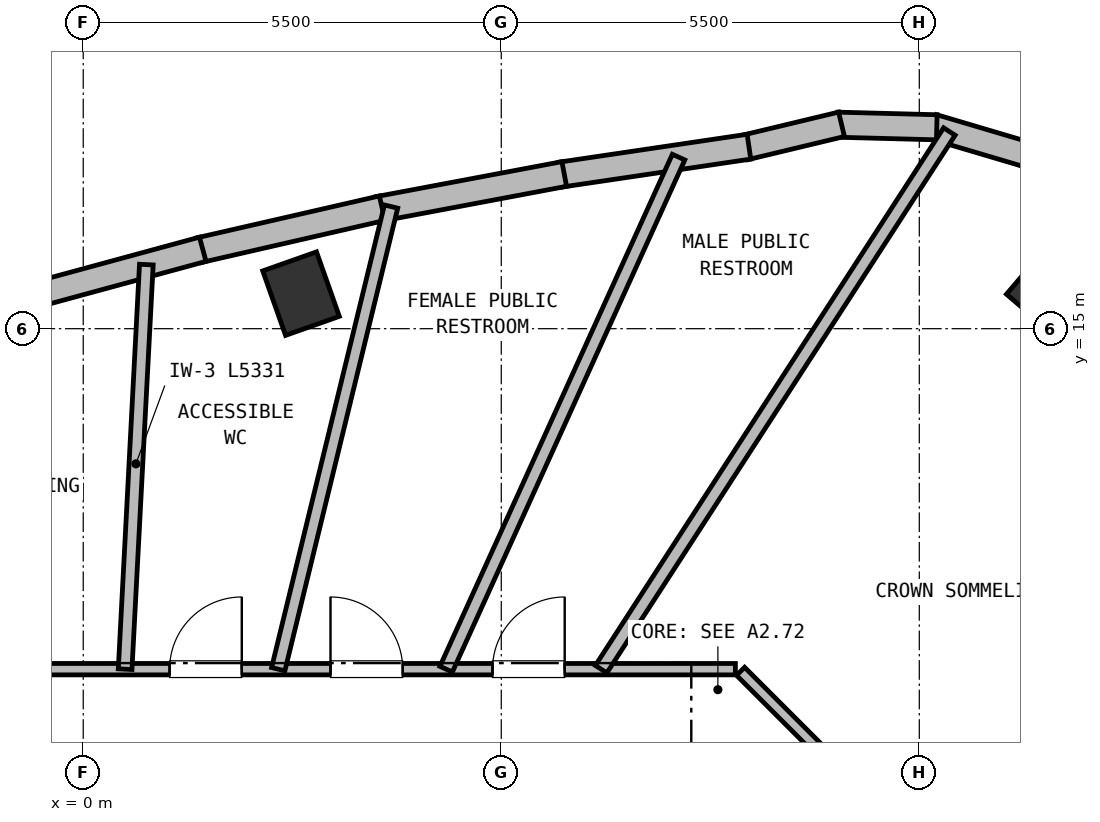
"""IFC4 building model, lengths in metres.
Left out: names, types, materials, properties, quantities, classifications, styles, units other than length and angle.
Written with IfcOpenShell. Run it as: python <this file> out.ifc"""

import sys

from ifc_helpers import new_model, si_unit, direction, frame, frame_2d, origin, origin_2d, place, context, subcontext, project, spatial, rectangle, extrude, element, fill, save


model = new_model("IFC4")
c1 = context("Model", 3, precision=1e-05, world=origin(), true_north=direction((0.0, 1.0)))
c2 = subcontext(c1, "Body", "Model", "MODEL_VIEW")
j1 = project(units=[si_unit("LENGTHUNIT", "METRE"), si_unit("PLANEANGLEUNIT", "RADIAN")], contexts=[c1])
p1 = place(None, origin())
s1 = spatial("IfcSite", under=j1, at=p1, CompositionType="ELEMENT")
p2 = place(p1, origin())
s2 = spatial("IfcBuilding", under=s1, at=p2, CompositionType="ELEMENT")
p3 = place(p2, frame((0.0, 0.0, 272.8)))
s3 = spatial("IfcBuildingStorey", under=s2, at=p3, CompositionType="ELEMENT", Elevation=272.8)
p4 = place(p3, frame((13.177, 15.428, 0.0), z_axis=(0.0, 0.0, 1.0), x_axis=(0.64944804833, 0.7604059656, 0.0)))
e1 = element("IfcColumn", 1, at=p4, inside=s3, PredefinedType="COLUMN", context=c2, shape_type="SweptSolid", body=[
    extrude(rectangle(XDim=1.3, YDim=1.6, at=origin_2d()), origin(), (0.0, 0.0, 1.0), 4.4),
])
p5 = place(p3, frame((2.865, 15.461, 0.0), z_axis=(0.0, 0.0, 1.0), x_axis=(0.942641491092, 0.333806859234, 0.0)))
e2 = element("IfcColumn", 2, at=p5, inside=s3, PredefinedType="COLUMN", context=c2, shape_type="SweptSolid", body=[
    extrude(rectangle(XDim=0.75, YDim=0.9, at=origin_2d()), origin(), (0.0, 0.0, 1.0), 4.4),
])
for number, where, z_axis, x_axis in (
    (3, (12.385, 17.308, 0.0), (0.0, 0.0, 1.0), (0.853, -0.523, 0.0)),
    (4, (11.181, 17.658, 0.0), (0.0, 0.0, 1.0), (0.959, -0.284, 0.0)),
    (5, (9.927, 17.684, 0.0), (0.0, 0.0, 1.0), (1.0, -0.026, 0.0)),
):
    element("IfcWall", number, at=place(p3, frame(where, z_axis=z_axis, x_axis=x_axis)), inside=s3, PredefinedType="SOLIDWALL", context=c2, shape_type="SweptSolid", body=[
        extrude(rectangle(XDim=1.303, YDim=0.33, at=frame_2d((0.652, 0.0))), origin(), (0.0, 0.0, 1.0), 4.15),
    ])
p6 = place(p3, frame((8.71, 17.385, 0.0), z_axis=(0.0, 0.0, 1.0), x_axis=(0.972360080062, 0.233486347997, 0.0)))
e6 = element("IfcWall", 6, at=p6, inside=s3, PredefinedType="SOLIDWALL", context=c2, shape_type="SweptSolid", body=[
    extrude(rectangle(XDim=1.303, YDim=0.33, at=frame_2d((0.651, 0.0))), origin(), (0.0, 0.0, 1.0), 4.15),
])
p7 = place(p3, frame((6.279, 17.027, 0.0), z_axis=(0.0, 0.0, 1.0), x_axis=(0.989195615859, 0.146601615152, 0.0)))
e7 = element("IfcWall", 7, at=p7, inside=s3, PredefinedType="SOLIDWALL", context=c2, shape_type="SweptSolid", body=[
    extrude(rectangle(XDim=2.506, YDim=0.33, at=frame_2d((1.253, 0.0))), origin(), (0.0, 0.0, 1.0), 4.15),
])
p8 = place(p3, frame((3.884, 16.575, 0.0), z_axis=(0.0, 0.0, 1.0), x_axis=(0.982755323562, 0.184910719024, 0.0)))
e8 = element("IfcWall", 8, at=p8, inside=s3, PredefinedType="SOLIDWALL", context=c2, shape_type="SweptSolid", body=[
    extrude(rectangle(XDim=2.488, YDim=0.33, at=frame_2d((1.244, 0.0))), origin(), (0.0, 0.0, 1.0), 4.15),
])
p9 = place(p3, frame((1.524, 16.033, 0.0), z_axis=(0.0, 0.0, 1.0), x_axis=(0.974681670362, 0.223597051545, 0.0)))
e9 = element("IfcWall", 9, at=p9, inside=s3, PredefinedType="SOLIDWALL", context=c2, shape_type="SweptSolid", body=[
    extrude(rectangle(XDim=2.472, YDim=0.33, at=frame_2d((1.236, 0.0))), origin(), (0.0, 0.0, 1.0), 4.15),
])
p10 = place(p3, frame((-0.802, 15.399, 0.0), z_axis=(0.0, 0.0, 1.0), x_axis=(0.964933096461, 0.262495941596, 0.0)))
e10 = element("IfcWall", 10, at=p10, inside=s3, PredefinedType="SOLIDWALL", context=c2, shape_type="SweptSolid", body=[
    extrude(rectangle(XDim=2.46, YDim=0.33, at=frame_2d((1.23, 0.0))), origin(), (0.0, 0.0, 1.0), 4.15),
])
p11 = place(p3, frame((8.648, 10.492, 0.0), z_axis=(0.0, 0.0, 1.0), x_axis=(0.707106781187, -0.707106781187, 0.0)))
e11 = element("IfcWall", 11, at=p11, inside=s3, PredefinedType="PARTITIONING", context=c2, shape_type="SweptSolid", body=[
    extrude(rectangle(XDim=2.508, YDim=0.15, at=frame_2d((1.254, 0.0))), origin(), (0.0, 0.0, 1.0), 4.15),
])
p12 = place(p3, frame((-11.51, 10.52, 0.0), z_axis=(0.0, 0.0, 1.0), x_axis=(1.0, 0.0, 0.0)))
e12 = element("IfcWall", 12, at=p12, inside=s3, PredefinedType="PARTITIONING", context=c2, shape_type="SweptSolid", body=[
    extrude(rectangle(XDim=20.09, YDim=0.15, at=frame_2d((10.045, 0.0))), origin(), (0.0, 0.0, 1.0), 4.15),
])
p13 = place(p12, frame((12.646, 0.0, 0.0)))
e13 = element("IfcOpeningElement", 13, at=p13, cuts=e12, PredefinedType="OPENING", context=c2, shape_type="SweptSolid", body=[
    extrude(rectangle(XDim=0.95, YDim=2.1, at=frame_2d((0.475, 1.05))), frame((0.0, 0.085, 0.0), z_axis=(0.0, -1.0, 0.0), x_axis=(1.0, 0.0, 0.0)), (0.0, 0.0, 1.0), 0.17),
])
p14 = place(p12, frame((14.763, 0.0, 0.0)))
e14 = element("IfcOpeningElement", 14, at=p14, cuts=e12, PredefinedType="OPENING", context=c2, shape_type="SweptSolid", body=[
    extrude(rectangle(XDim=0.95, YDim=2.1, at=frame_2d((0.475, 1.05))), frame((0.0, 0.085, 0.0), z_axis=(0.0, -1.0, 0.0), x_axis=(1.0, 0.0, 0.0)), (0.0, 0.0, 1.0), 0.17),
])
p15 = place(p12, frame((16.895, 0.0, 0.0)))
e15 = element("IfcOpeningElement", 15, at=p15, cuts=e12, PredefinedType="OPENING", context=c2, shape_type="SweptSolid", body=[
    extrude(rectangle(XDim=0.95, YDim=2.1, at=frame_2d((0.475, 1.05))), frame((0.0, 0.085, 0.0), z_axis=(0.0, -1.0, 0.0), x_axis=(1.0, 0.0, 0.0)), (0.0, 0.0, 1.0), 0.17),
])
p16 = place(p12, frame((5.671, 0.0, 0.0)))
e16 = element("IfcOpeningElement", 16, at=p16, cuts=e12, PredefinedType="OPENING", context=c2, shape_type="SweptSolid", body=[
    extrude(rectangle(XDim=1.0, YDim=2.15, at=frame_2d((0.5, 1.075))), frame((0.0, 0.085, 0.0), z_axis=(0.0, -1.0, 0.0), x_axis=(1.0, 0.0, 0.0)), (0.0, 0.0, 1.0), 0.17),
])
p17 = place(p3, frame((0.551, 10.52, 0.0), z_axis=(0.0, 0.0, 1.0), x_axis=(0.05234969433, 0.998628814677, 0.0)))
e17 = element("IfcWall", 17, at=p17, inside=s3, PredefinedType="PARTITIONING", context=c2, shape_type="SweptSolid", body=[
    extrude(rectangle(XDim=5.331, YDim=0.18, at=frame_2d((2.665, 0.0))), origin(), (0.0, 0.0, 1.0), 4.15),
])
p18 = place(p3, frame((6.814, 10.52, 0.0), z_axis=(0.0, 0.0, 1.0), x_axis=(0.543628362799, 0.839326041035, 0.0)))
e18 = element("IfcWall", 18, at=p18, inside=s3, PredefinedType="PARTITIONING", context=c2, shape_type="SweptSolid", body=[
    extrude(rectangle(XDim=8.428, YDim=0.18, at=frame_2d((4.214, 0.0))), origin(), (0.0, 0.0, 1.0), 4.15),
])
p19 = place(p3, frame((4.775, 10.52, 0.0), z_axis=(0.0, 0.0, 1.0), x_axis=(0.41332058742, 0.910585576437, 0.0)))
e19 = element("IfcWall", 19, at=p19, inside=s3, PredefinedType="PARTITIONING", context=c2, shape_type="SweptSolid", body=[
    extrude(rectangle(XDim=7.399, YDim=0.18, at=frame_2d((3.699, 0.0))), origin(), (0.0, 0.0, 1.0), 4.15),
])
p20 = place(p3, frame((2.566, 10.52, 0.0), z_axis=(0.0, 0.0, 1.0), x_axis=(0.236966048056, 0.971517931934, 0.0)))
e20 = element("IfcWall", 20, at=p20, inside=s3, PredefinedType="PARTITIONING", context=c2, shape_type="SweptSolid", body=[
    extrude(rectangle(XDim=6.265, YDim=0.18, at=frame_2d((3.133, 0.0))), origin(), (0.0, 0.0, 1.0), 4.15),
])
p21 = place(p13, origin())
e21 = element("IfcDoor", 21, at=p21, inside=s3, OperationType="SINGLE_SWING_RIGHT", PredefinedType="DOOR", context=c2, shape_type="SweptSolid", body=[
    extrude(rectangle(XDim=0.95, YDim=2.1, at=frame_2d((0.475, 1.05))), frame((0.0, 0.025, 0.0), z_axis=(0.0, -1.0, 0.0), x_axis=(1.0, 0.0, 0.0)), (0.0, 0.0, 1.0), 0.05),
])
fill(e13, e21)
p22 = place(p14, origin())
e22 = element("IfcDoor", 22, at=p22, inside=s3, OperationType="SINGLE_SWING_LEFT", PredefinedType="DOOR", context=c2, shape_type="SweptSolid", body=[
    extrude(rectangle(XDim=0.95, YDim=2.1, at=frame_2d((0.475, 1.05))), frame((0.0, 0.025, 0.0), z_axis=(0.0, -1.0, 0.0), x_axis=(1.0, 0.0, 0.0)), (0.0, 0.0, 1.0), 0.05),
])
fill(e14, e22)
p23 = place(p15, origin())
e23 = element("IfcDoor", 23, at=p23, inside=s3, OperationType="SINGLE_SWING_RIGHT", PredefinedType="DOOR", context=c2, shape_type="SweptSolid", body=[
    extrude(rectangle(XDim=0.95, YDim=2.1, at=frame_2d((0.475, 1.05))), frame((0.0, 0.025, 0.0), z_axis=(0.0, -1.0, 0.0), x_axis=(1.0, 0.0, 0.0)), (0.0, 0.0, 1.0), 0.05),
])
fill(e15, e23)
save(model, sys.argv[1])
